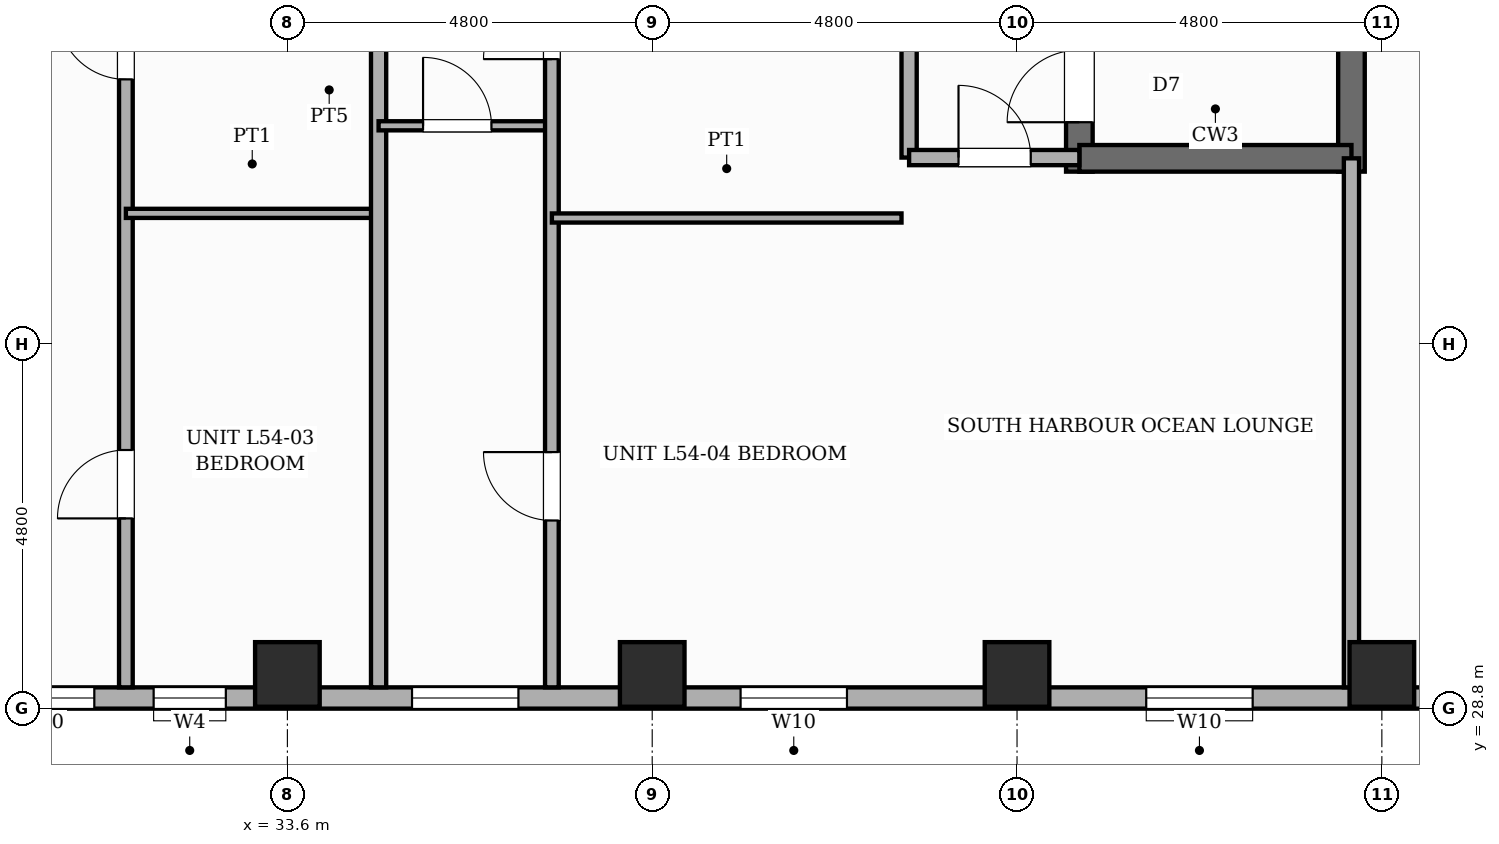
"""IFC4 building model, lengths in metres.
Left out: names, types, materials, properties, quantities, classifications, styles, units other than length and angle.
Written with IfcOpenShell. Run it as: python <this file> out.ifc"""

import sys

from ifc_helpers import new_model, si_unit, direction, frame, frame_2d, origin, origin_2d, place, context, subcontext, project, spatial, rectangle, extrude, element, fill, save


model = new_model("IFC4")
c1 = context("Model", 3, precision=1e-05, world=origin(), true_north=direction((0.0, 1.0)))
c2 = subcontext(c1, "Body", "Model", "MODEL_VIEW")
j1 = project(units=[si_unit("LENGTHUNIT", "METRE"), si_unit("PLANEANGLEUNIT", "RADIAN")], contexts=[c1])
p1 = place(None, origin())
s1 = spatial("IfcSite", under=j1, at=p1, CompositionType="ELEMENT")
p2 = place(p1, origin())
s2 = spatial("IfcBuilding", under=s1, at=p2, CompositionType="ELEMENT")
p3 = place(p2, frame((0.0, 0.0, 207.4)))
s3 = spatial("IfcBuildingStorey", under=s2, at=p3, CompositionType="ELEMENT", Elevation=207.4)
p4 = place(p3, frame((44.02, 35.865, 0.0), z_axis=(0.0, 0.0, 1.0), x_axis=(0.0, 1.0, 0.0)))
e1 = element("IfcWall", 1, at=p4, inside=s3, PredefinedType="SHEAR", context=c2, shape_type="SweptSolid", body=[
    extrude(rectangle(XDim=8.97, YDim=0.35, at=frame_2d((4.485, 0.0))), origin(), (0.0, 0.0, 1.0), 3.6),
])
p5 = place(p4, frame((0.65, 0.0, 0.0)))
e2 = element("IfcOpeningElement", 2, at=p5, cuts=e1, PredefinedType="OPENING", context=c2, shape_type="SweptSolid", body=[
    extrude(rectangle(XDim=0.95, YDim=2.1, at=frame_2d((0.475, 1.05))), frame((0.0, 0.185, 0.0), z_axis=(0.0, -1.0, 0.0), x_axis=(1.0, 0.0, 0.0)), (0.0, 0.0, 1.0), 0.37),
])
p6 = place(p3, frame((47.6, 35.865, 0.0), z_axis=(0.0, 0.0, 1.0), x_axis=(0.0, 1.0, 0.0)))
e3 = element("IfcWall", 3, at=p6, inside=s3, PredefinedType="SHEAR", context=c2, shape_type="SweptSolid", body=[
    extrude(rectangle(XDim=8.97, YDim=0.35, at=frame_2d((4.485, 0.0))), origin(), (0.0, 0.0, 1.0), 3.6),
])
p7 = place(p3, frame((44.02, 36.04, 0.0), z_axis=(0.0, 0.0, 1.0), x_axis=(1.0, 0.0, 0.0)))
e4 = element("IfcWall", 4, at=p7, inside=s3, PredefinedType="SHEAR", context=c2, shape_type="SweptSolid", body=[
    extrude(rectangle(XDim=3.58, YDim=0.35, at=frame_2d((1.79, 0.0))), origin(), (0.0, 0.0, 1.0), 3.6),
])
for number, where, z_axis, x_axis in (
    (5, (33.6, 29.25, 0.0), (0.0, 0.0, 1.0), (1.0, 0.0, 0.0)),
    (6, (38.4, 29.25, 0.0), (0.0, 0.0, 1.0), (1.0, 0.0, 0.0)),
    (7, (43.2, 29.25, 0.0), (0.0, 0.0, 1.0), (1.0, 0.0, 0.0)),
    (8, (48.0, 29.25, 0.0), (0.0, 0.0, 1.0), (1.0, 0.0, 0.0)),
):
    element("IfcColumn", number, at=place(p3, frame(where, z_axis=z_axis, x_axis=x_axis)), inside=s3, PredefinedType="COLUMN", context=c2, shape_type="SweptSolid", body=[
        extrude(rectangle(XDim=0.85, YDim=0.85, at=origin_2d()), origin(), (0.0, 0.0, 1.0), 3.6),
    ])
p8 = place(p3, frame((50.4, 28.94, 0.0), z_axis=(0.0, 0.0, 1.0), x_axis=(-1.0, 0.0, 0.0)))
e9 = element("IfcWall", 9, at=p8, inside=s3, PredefinedType="STANDARD", context=c2, shape_type="SweptSolid", body=[
    extrude(rectangle(XDim=24.0, YDim=0.28, at=frame_2d((12.0, 0.0))), origin(), (0.0, 0.0, 1.0), 2.66),
])
p9 = place(p8, frame((17.61, 0.0, 0.45)))
e10 = element("IfcOpeningElement", 10, at=p9, cuts=e9, PredefinedType="OPENING", context=c2, shape_type="SweptSolid", body=[
    extrude(rectangle(XDim=0.95, YDim=1.8, at=frame_2d((0.475, 0.9))), frame((0.0, 0.15, 0.0), z_axis=(0.0, -1.0, 0.0), x_axis=(1.0, 0.0, 0.0)), (0.0, 0.0, 1.0), 0.3),
])
p10 = place(p8, frame((9.438, 0.0, 0.65)))
e11 = element("IfcOpeningElement", 11, at=p10, cuts=e9, PredefinedType="OPENING", context=c2, shape_type="SweptSolid", body=[
    extrude(rectangle(XDim=1.4, YDim=1.1, at=frame_2d((0.7, 0.55))), frame((0.0, 0.15, 0.0), z_axis=(0.0, -1.0, 0.0), x_axis=(1.0, 0.0, 0.0)), (0.0, 0.0, 1.0), 0.3),
])
p11 = place(p8, frame((22.555, 0.0, 0.45)))
e12 = element("IfcOpeningElement", 12, at=p11, cuts=e9, PredefinedType="OPENING", context=c2, shape_type="SweptSolid", body=[
    extrude(rectangle(XDim=0.95, YDim=1.8, at=frame_2d((0.475, 0.9))), frame((0.0, 0.15, 0.0), z_axis=(0.0, -1.0, 0.0), x_axis=(1.0, 0.0, 0.0)), (0.0, 0.0, 1.0), 0.3),
])
p12 = place(p8, frame((4.1, 0.0, 0.65)))
e13 = element("IfcOpeningElement", 13, at=p12, cuts=e9, PredefinedType="OPENING", context=c2, shape_type="SweptSolid", body=[
    extrude(rectangle(XDim=1.4, YDim=1.1, at=frame_2d((0.7, 0.55))), frame((0.0, 0.15, 0.0), z_axis=(0.0, -1.0, 0.0), x_axis=(1.0, 0.0, 0.0)), (0.0, 0.0, 1.0), 0.3),
])
p13 = place(p8, frame((19.34, 0.0, 0.65)))
e14 = element("IfcOpeningElement", 14, at=p13, cuts=e9, PredefinedType="OPENING", context=c2, shape_type="SweptSolid", body=[
    extrude(rectangle(XDim=1.4, YDim=1.1, at=frame_2d((0.7, 0.55))), frame((0.0, 0.15, 0.0), z_axis=(0.0, -1.0, 0.0), x_axis=(1.0, 0.0, 0.0)), (0.0, 0.0, 1.0), 0.3),
])
p14 = place(p8, frame((13.76, 0.0, 0.65)))
e15 = element("IfcOpeningElement", 15, at=p14, cuts=e9, PredefinedType="OPENING", context=c2, shape_type="SweptSolid", body=[
    extrude(rectangle(XDim=1.4, YDim=1.1, at=frame_2d((0.7, 0.55))), frame((0.0, 0.15, 0.0), z_axis=(0.0, -1.0, 0.0), x_axis=(1.0, 0.0, 0.0)), (0.0, 0.0, 1.0), 0.3),
])
p15 = place(p8, frame((0.681, 0.0, 0.45)))
e16 = element("IfcOpeningElement", 16, at=p15, cuts=e9, PredefinedType="OPENING", context=c2, shape_type="SweptSolid", body=[
    extrude(rectangle(XDim=0.95, YDim=1.8, at=frame_2d((0.475, 0.9))), frame((0.0, 0.15, 0.0), z_axis=(0.0, -1.0, 0.0), x_axis=(1.0, 0.0, 0.0)), (0.0, 0.0, 1.0), 0.3),
])
p16 = place(p3, frame((41.78, 36.05, 0.0), z_axis=(0.0, 0.0, 1.0), x_axis=(0.0, 1.0, 0.0)))
e17 = element("IfcWall", 17, at=p16, inside=s3, PredefinedType="PARTITIONING", context=c2, shape_type="SweptSolid", body=[
    extrude(rectangle(XDim=8.75, YDim=0.2, at=frame_2d((4.375, 0.0))), origin(), (0.0, 0.0, 1.0), 3.38),
])
p17 = place(p3, frame((41.78, 36.05, 0.0), z_axis=(0.0, 0.0, 1.0), x_axis=(1.0, 0.0, 0.0)))
e18 = element("IfcWall", 18, at=p17, inside=s3, PredefinedType="PARTITIONING", context=c2, shape_type="SweptSolid", body=[
    extrude(rectangle(XDim=2.24, YDim=0.2, at=frame_2d((1.12, 0.0))), origin(), (0.0, 0.0, 1.0), 3.38),
])
p18 = place(p17, frame((0.65, 0.0, 0.0)))
e19 = element("IfcOpeningElement", 19, at=p18, cuts=e18, PredefinedType="OPENING", context=c2, shape_type="SweptSolid", body=[
    extrude(rectangle(XDim=0.95, YDim=2.15, at=frame_2d((0.475, 1.075))), frame((0.0, 0.11, 0.0), z_axis=(0.0, -1.0, 0.0), x_axis=(1.0, 0.0, 0.0)), (0.0, 0.0, 1.0), 0.22),
])
p19 = place(p3, frame((31.475, 29.08, 0.0), z_axis=(0.0, 0.0, 1.0), x_axis=(0.0, 1.0, 0.0)))
e20 = element("IfcWall", 20, at=p19, inside=s3, PredefinedType="PLUMBINGWALL", context=c2, shape_type="SweptSolid", body=[
    extrude(rectangle(XDim=15.62, YDim=0.18, at=frame_2d((7.81, 0.0))), origin(), (0.0, 0.0, 1.0), 3.38),
])
p20 = place(p19, frame((2.223, 0.0, 0.0)))
e21 = element("IfcOpeningElement", 21, at=p20, cuts=e20, PredefinedType="OPENING", context=c2, shape_type="SweptSolid", body=[
    extrude(rectangle(XDim=0.9, YDim=2.15, at=frame_2d((0.45, 1.075))), frame((0.0, 0.1, 0.0), z_axis=(0.0, -1.0, 0.0), x_axis=(1.0, 0.0, 0.0)), (0.0, 0.0, 1.0), 0.2),
])
p21 = place(p19, frame((7.999, 0.0, 0.0)))
e22 = element("IfcOpeningElement", 22, at=p21, cuts=e20, PredefinedType="OPENING", context=c2, shape_type="SweptSolid", body=[
    extrude(rectangle(XDim=0.9, YDim=2.15, at=frame_2d((0.45, 1.075))), frame((0.0, 0.1, 0.0), z_axis=(0.0, -1.0, 0.0), x_axis=(1.0, 0.0, 0.0)), (0.0, 0.0, 1.0), 0.2),
])
p22 = place(p19, frame((12.75, 0.0, 0.0)))
e23 = element("IfcOpeningElement", 23, at=p22, cuts=e20, PredefinedType="OPENING", context=c2, shape_type="SweptSolid", body=[
    extrude(rectangle(XDim=0.86, YDim=2.1, at=frame_2d((0.43, 1.05))), frame((0.0, 0.1, 0.0), z_axis=(0.0, -1.0, 0.0), x_axis=(1.0, 0.0, 0.0)), (0.0, 0.0, 1.0), 0.2),
])
p23 = place(p3, frame((31.475, 35.316, 0.0), z_axis=(0.0, 0.0, 1.0), x_axis=(1.0, 0.0, 0.0)))
e24 = element("IfcWall", 24, at=p23, inside=s3, PredefinedType="PARTITIONING", context=c2, shape_type="SweptSolid", body=[
    extrude(rectangle(XDim=3.325, YDim=0.12, at=frame_2d((1.663, 0.0))), origin(), (0.0, 0.0, 1.0), 3.38),
])
p24 = place(p3, frame((34.8, 29.08, 0.0), z_axis=(0.0, 0.0, 1.0), x_axis=(0.0, 1.0, 0.0)))
e25 = element("IfcWall", 25, at=p24, inside=s3, PredefinedType="SOLIDWALL", context=c2, shape_type="SweptSolid", body=[
    extrude(rectangle(XDim=15.72, YDim=0.2, at=frame_2d((7.86, 0.0))), origin(), (0.0, 0.0, 1.0), 3.38),
])
p25 = place(p3, frame((34.8, 36.468, 0.0), z_axis=(0.0, 0.0, 1.0), x_axis=(1.0, 0.0, 0.0)))
e26 = element("IfcWall", 26, at=p25, inside=s3, PredefinedType="PARTITIONING", context=c2, shape_type="SweptSolid", body=[
    extrude(rectangle(XDim=2.28, YDim=0.12, at=frame_2d((1.14, 0.0))), origin(), (0.0, 0.0, 1.0), 3.38),
])
p26 = place(p25, frame((0.585, 0.0, 0.0)))
e27 = element("IfcOpeningElement", 27, at=p26, cuts=e26, PredefinedType="OPENING", context=c2, shape_type="SweptSolid", body=[
    extrude(rectangle(XDim=0.9, YDim=2.15, at=frame_2d((0.45, 1.075))), frame((0.0, 0.07, 0.0), z_axis=(0.0, -1.0, 0.0), x_axis=(1.0, 0.0, 0.0)), (0.0, 0.0, 1.0), 0.14),
])
p27 = place(p3, frame((37.08, 29.08, 0.0), z_axis=(0.0, 0.0, 1.0), x_axis=(0.0, 1.0, 0.0)))
e28 = element("IfcWall", 28, at=p27, inside=s3, PredefinedType="PLUMBINGWALL", context=c2, shape_type="SweptSolid", body=[
    extrude(rectangle(XDim=15.62, YDim=0.18, at=frame_2d((7.81, 0.0))), origin(), (0.0, 0.0, 1.0), 3.38),
])
p28 = place(p27, frame((2.195, 0.0, 0.0)))
e29 = element("IfcOpeningElement", 29, at=p28, cuts=e28, PredefinedType="OPENING", context=c2, shape_type="SweptSolid", body=[
    extrude(rectangle(XDim=0.9, YDim=2.15, at=frame_2d((0.45, 1.075))), frame((0.0, 0.1, 0.0), z_axis=(0.0, -1.0, 0.0), x_axis=(1.0, 0.0, 0.0)), (0.0, 0.0, 1.0), 0.2),
])
p29 = place(p27, frame((8.265, 0.0, 0.0)))
e30 = element("IfcOpeningElement", 30, at=p29, cuts=e28, PredefinedType="OPENING", context=c2, shape_type="SweptSolid", body=[
    extrude(rectangle(XDim=0.9, YDim=2.15, at=frame_2d((0.45, 1.075))), frame((0.0, 0.1, 0.0), z_axis=(0.0, -1.0, 0.0), x_axis=(1.0, 0.0, 0.0)), (0.0, 0.0, 1.0), 0.2),
])
p30 = place(p27, frame((13.117, 0.0, 0.0)))
e31 = element("IfcOpeningElement", 31, at=p30, cuts=e28, PredefinedType="OPENING", context=c2, shape_type="SweptSolid", body=[
    extrude(rectangle(XDim=0.86, YDim=2.1, at=frame_2d((0.43, 1.05))), frame((0.0, 0.1, 0.0), z_axis=(0.0, -1.0, 0.0), x_axis=(1.0, 0.0, 0.0)), (0.0, 0.0, 1.0), 0.2),
])
p31 = place(p3, frame((37.08, 35.255, 0.0), z_axis=(0.0, 0.0, 1.0), x_axis=(1.0, 0.0, 0.0)))
e32 = element("IfcWall", 32, at=p31, inside=s3, PredefinedType="PARTITIONING", context=c2, shape_type="SweptSolid", body=[
    extrude(rectangle(XDim=4.6, YDim=0.12, at=frame_2d((2.3, 0.0))), origin(), (0.0, 0.0, 1.0), 3.38),
])
p32 = place(p3, frame((47.6, 29.08, 0.0), z_axis=(0.0, 0.0, 1.0), x_axis=(0.0, 1.0, 0.0)))
e33 = element("IfcWall", 33, at=p32, inside=s3, PredefinedType="SOLIDWALL", context=c2, shape_type="SweptSolid", body=[
    extrude(rectangle(XDim=6.96, YDim=0.2, at=frame_2d((3.48, 0.0))), origin(), (0.0, 0.0, 1.0), 3.38),
])
p33 = place(p9, origin())
e34 = element("IfcWindow", 34, at=p33, inside=s3, PartitioningType="SINGLE_PANEL", PredefinedType="WINDOW", context=c2, shape_type="SweptSolid", body=[
    extrude(rectangle(XDim=0.95, YDim=1.8, at=frame_2d((0.475, 0.9))), frame((0.0, 0.03, 0.0), z_axis=(0.0, -1.0, 0.0), x_axis=(1.0, 0.0, 0.0)), (0.0, 0.0, 1.0), 0.06),
])
fill(e10, e34)
p34 = place(p10, origin())
e35 = element("IfcWindow", 35, at=p34, inside=s3, PartitioningType="SINGLE_PANEL", PredefinedType="WINDOW", context=c2, shape_type="SweptSolid", body=[
    extrude(rectangle(XDim=1.4, YDim=1.1, at=frame_2d((0.7, 0.55))), frame((0.0, 0.03, 0.0), z_axis=(0.0, -1.0, 0.0), x_axis=(1.0, 0.0, 0.0)), (0.0, 0.0, 1.0), 0.06),
])
fill(e11, e35)
p35 = place(p12, origin())
e36 = element("IfcWindow", 36, at=p35, inside=s3, PartitioningType="SINGLE_PANEL", PredefinedType="WINDOW", context=c2, shape_type="SweptSolid", body=[
    extrude(rectangle(XDim=1.4, YDim=1.1, at=frame_2d((0.7, 0.55))), frame((0.0, 0.03, 0.0), z_axis=(0.0, -1.0, 0.0), x_axis=(1.0, 0.0, 0.0)), (0.0, 0.0, 1.0), 0.06),
])
fill(e13, e36)
p36 = place(p13, origin())
e37 = element("IfcWindow", 37, at=p36, inside=s3, PartitioningType="SINGLE_PANEL", PredefinedType="WINDOW", context=c2, shape_type="SweptSolid", body=[
    extrude(rectangle(XDim=1.4, YDim=1.1, at=frame_2d((0.7, 0.55))), frame((0.0, 0.03, 0.0), z_axis=(0.0, -1.0, 0.0), x_axis=(1.0, 0.0, 0.0)), (0.0, 0.0, 1.0), 0.06),
])
fill(e14, e37)
p37 = place(p14, origin())
e38 = element("IfcWindow", 38, at=p37, inside=s3, PartitioningType="SINGLE_PANEL", PredefinedType="WINDOW", context=c2, shape_type="SweptSolid", body=[
    extrude(rectangle(XDim=1.4, YDim=1.1, at=frame_2d((0.7, 0.55))), frame((0.0, 0.03, 0.0), z_axis=(0.0, -1.0, 0.0), x_axis=(1.0, 0.0, 0.0)), (0.0, 0.0, 1.0), 0.06),
])
fill(e15, e38)
p38 = place(p5, origin())
e39 = element("IfcDoor", 39, at=p38, inside=s3, OperationType="SINGLE_SWING_LEFT", PredefinedType="DOOR", context=c2, shape_type="SweptSolid", body=[
    extrude(rectangle(XDim=0.95, YDim=2.1, at=frame_2d((0.475, 1.05))), frame((0.0, 0.025, 0.0), z_axis=(0.0, -1.0, 0.0), x_axis=(1.0, 0.0, 0.0)), (0.0, 0.0, 1.0), 0.05),
])
fill(e2, e39)
p39 = place(p20, origin())
e40 = element("IfcDoor", 40, at=p39, inside=s3, OperationType="SINGLE_SWING_LEFT", PredefinedType="DOOR", context=c2, shape_type="SweptSolid", body=[
    extrude(rectangle(XDim=0.9, YDim=2.15, at=frame_2d((0.45, 1.075))), frame((0.0, 0.025, 0.0), z_axis=(0.0, -1.0, 0.0), x_axis=(1.0, 0.0, 0.0)), (0.0, 0.0, 1.0), 0.05),
])
fill(e21, e40)
p40 = place(p21, origin())
e41 = element("IfcDoor", 41, at=p40, inside=s3, OperationType="SINGLE_SWING_RIGHT", PredefinedType="DOOR", context=c2, shape_type="SweptSolid", body=[
    extrude(rectangle(XDim=0.9, YDim=2.15, at=frame_2d((0.45, 1.075))), frame((0.0, 0.025, 0.0), z_axis=(0.0, -1.0, 0.0), x_axis=(1.0, 0.0, 0.0)), (0.0, 0.0, 1.0), 0.05),
])
fill(e22, e41)
p41 = place(p26, origin())
e42 = element("IfcDoor", 42, at=p41, inside=s3, OperationType="SINGLE_SWING_LEFT", PredefinedType="DOOR", context=c2, shape_type="SweptSolid", body=[
    extrude(rectangle(XDim=0.9, YDim=2.15, at=frame_2d((0.45, 1.075))), frame((0.0, 0.025, 0.0), z_axis=(0.0, -1.0, 0.0), x_axis=(1.0, 0.0, 0.0)), (0.0, 0.0, 1.0), 0.05),
])
fill(e27, e42)
p42 = place(p28, origin())
e43 = element("IfcDoor", 43, at=p42, inside=s3, OperationType="SINGLE_SWING_RIGHT", PredefinedType="DOOR", context=c2, shape_type="SweptSolid", body=[
    extrude(rectangle(XDim=0.9, YDim=2.15, at=frame_2d((0.45, 1.075))), frame((0.0, 0.025, 0.0), z_axis=(0.0, -1.0, 0.0), x_axis=(1.0, 0.0, 0.0)), (0.0, 0.0, 1.0), 0.05),
])
fill(e29, e43)
p43 = place(p29, origin())
e44 = element("IfcDoor", 44, at=p43, inside=s3, OperationType="SINGLE_SWING_LEFT", PredefinedType="DOOR", context=c2, shape_type="SweptSolid", body=[
    extrude(rectangle(XDim=0.9, YDim=2.15, at=frame_2d((0.45, 1.075))), frame((0.0, 0.025, 0.0), z_axis=(0.0, -1.0, 0.0), x_axis=(1.0, 0.0, 0.0)), (0.0, 0.0, 1.0), 0.05),
])
fill(e30, e44)
p44 = place(p18, origin())
e45 = element("IfcDoor", 45, at=p44, inside=s3, OperationType="SINGLE_SWING_LEFT", PredefinedType="DOOR", context=c2, shape_type="SweptSolid", body=[
    extrude(rectangle(XDim=0.95, YDim=2.15, at=frame_2d((0.475, 1.075))), frame((0.0, 0.025, 0.0), z_axis=(0.0, -1.0, 0.0), x_axis=(1.0, 0.0, 0.0)), (0.0, 0.0, 1.0), 0.05),
])
fill(e19, e45)
save(model, sys.argv[1])
